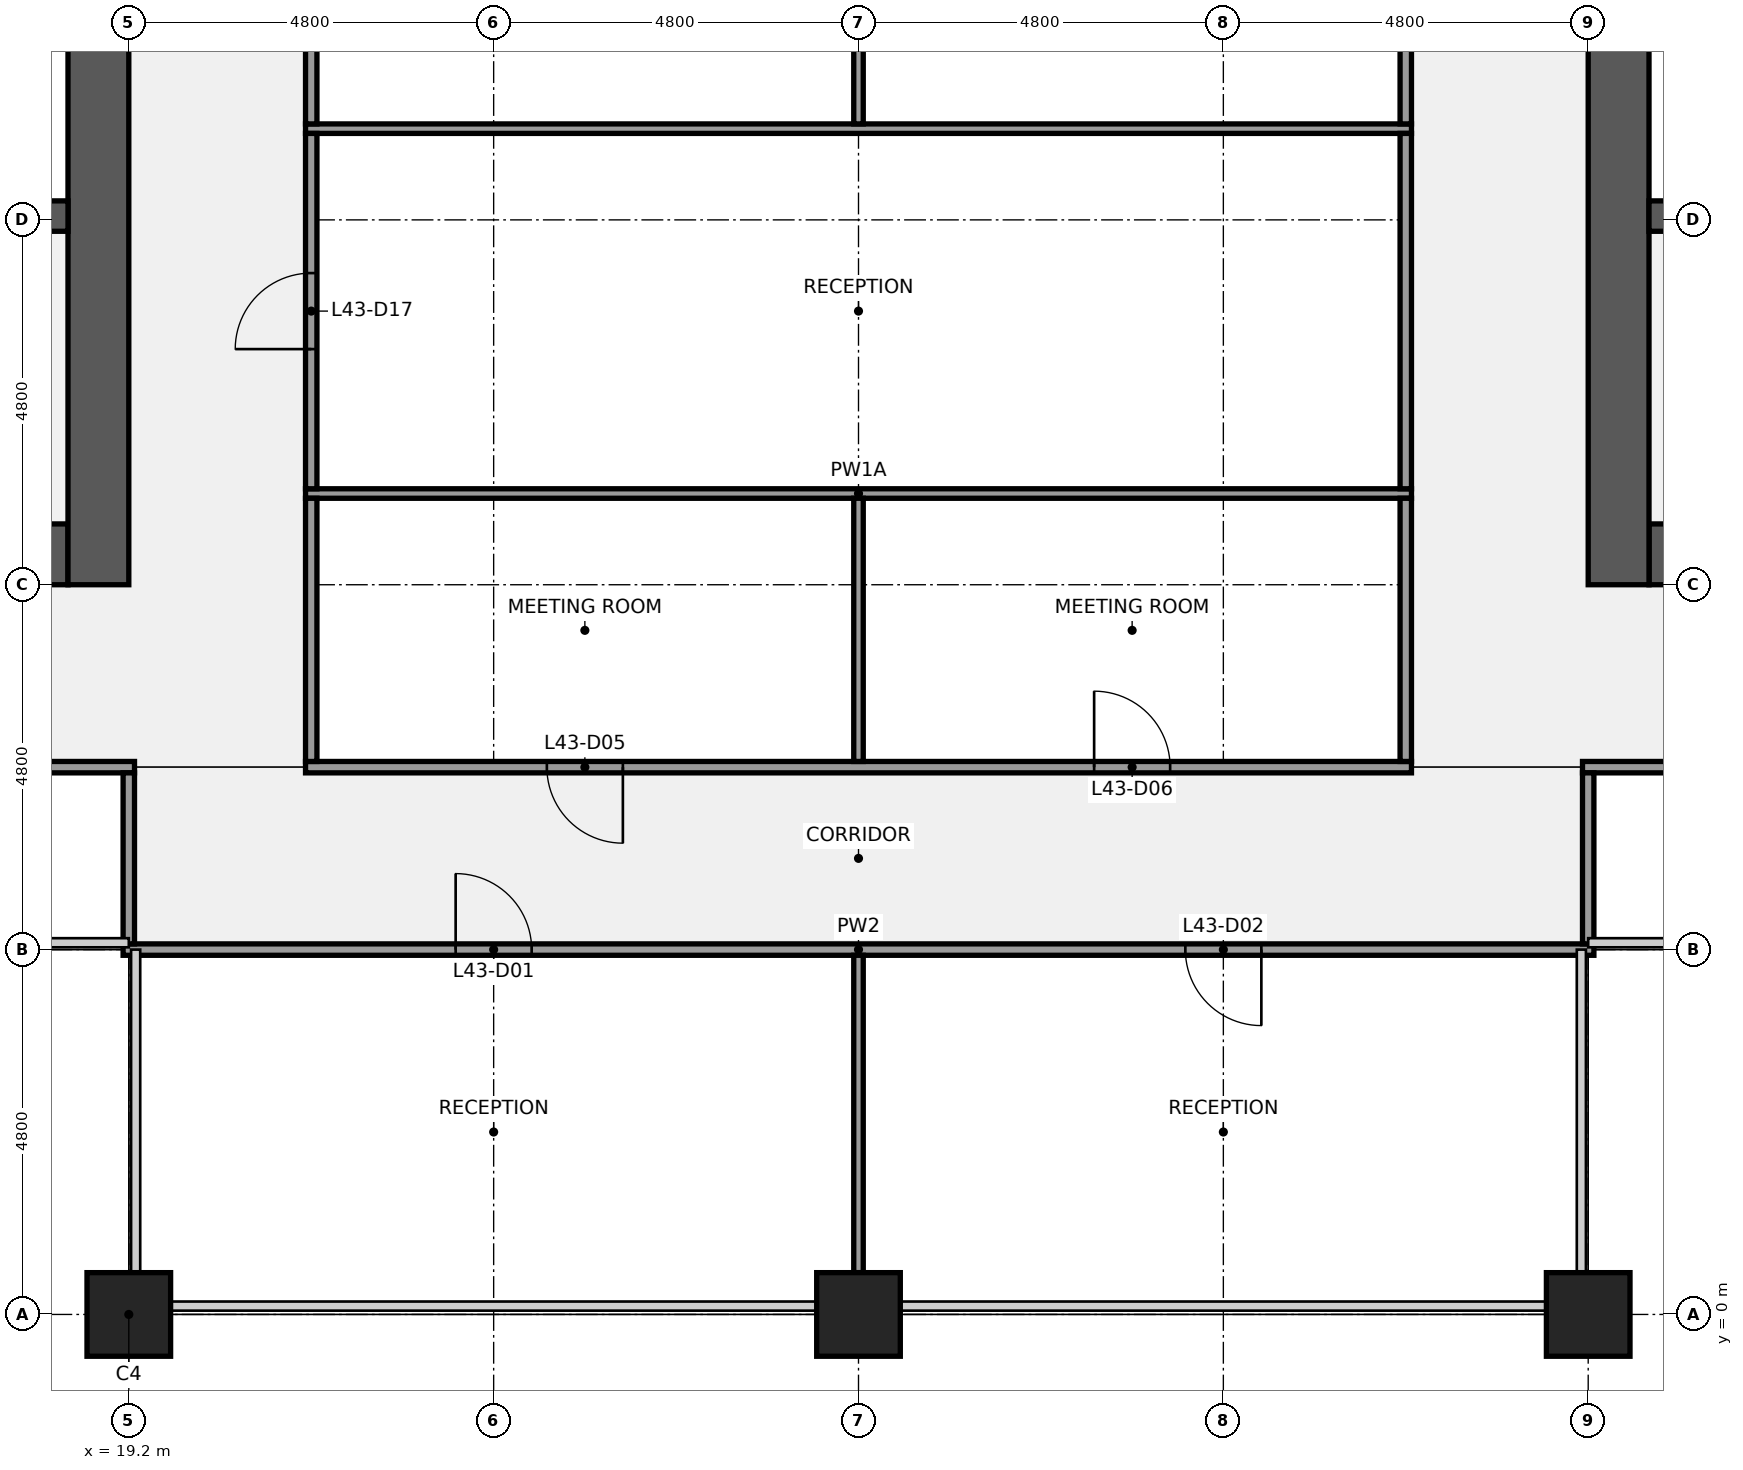
"""IFC4 building model, lengths in metres.
Left out: names, types, materials, properties, quantities, classifications, styles, units other than length and angle.
Written with IfcOpenShell. Run it as: python <this file> out.ifc"""

import sys

from ifc_helpers import new_model, si_unit, direction, frame, frame_2d, origin, origin_2d, place, context, subcontext, project, spatial, rectangle, extrude, element, fill, save


model = new_model("IFC4")
c1 = context("Model", 3, precision=1e-05, world=origin(), true_north=direction((0.0, 1.0)))
c2 = subcontext(c1, "Body", "Model", "MODEL_VIEW")
j1 = project(units=[si_unit("LENGTHUNIT", "METRE"), si_unit("PLANEANGLEUNIT", "RADIAN")], contexts=[c1])
p1 = place(None, origin())
s1 = spatial("IfcSite", under=j1, at=p1, CompositionType="ELEMENT")
p2 = place(p1, origin())
s2 = spatial("IfcBuilding", under=s1, at=p2, CompositionType="ELEMENT")
p3 = place(p2, frame((0.0, 0.0, 201.2)))
s3 = spatial("IfcBuildingStorey", under=s2, at=p3, CompositionType="ELEMENT", Elevation=201.2)
for number, where, z_axis, x_axis in (
    (1, (19.2, 0.0, 0.0), (0.0, 0.0, 1.0), (1.0, 0.0, 0.0)),
    (2, (28.8, 0.0, 0.0), (0.0, 0.0, 1.0), (1.0, 0.0, 0.0)),
    (3, (38.4, 0.0, 0.0), (0.0, 0.0, 1.0), (1.0, 0.0, 0.0)),
):
    element("IfcColumn", number, at=place(p3, frame(where, z_axis=z_axis, x_axis=x_axis)), inside=s3, PredefinedType="COLUMN", context=c2, shape_type="SweptSolid", body=[
        extrude(rectangle(XDim=1.1, YDim=1.1, at=origin_2d()), origin(), (0.0, 0.0, 1.0), 4.0),
    ])
p4 = place(p3, frame((18.4, 10.0, 0.0), z_axis=(0.0, 0.0, 1.0), x_axis=(-1.0, 0.0, 0.0)))
e4 = element("IfcWall", 4, at=p4, inside=s3, PredefinedType="SHEAR", context=c2, shape_type="SweptSolid", body=[
    extrude(rectangle(XDim=8.8, YDim=0.8, at=frame_2d((4.4, 0.0))), origin(), (0.0, 0.0, 1.0), 3.84),
])
p5 = place(p4, frame((1.05, 0.0, 0.0)))
e5 = element("IfcOpeningElement", 5, at=p5, cuts=e4, PredefinedType="OPENING", context=c2, shape_type="SweptSolid", body=[
    extrude(rectangle(XDim=1.1, YDim=2.1, at=frame_2d((0.55, 1.05))), frame((0.0, 0.41, 0.0), z_axis=(0.0, -1.0, 0.0), x_axis=(1.0, 0.0, 0.0)), (0.0, 0.0, 1.0), 0.82),
])
p6 = place(p3, frame((18.8, 38.4, 0.0), z_axis=(0.0, 0.0, 1.0), x_axis=(0.0, -1.0, 0.0)))
e6 = element("IfcWall", 6, at=p6, inside=s3, PredefinedType="SHEAR", context=c2, shape_type="SweptSolid", body=[
    extrude(rectangle(XDim=28.8, YDim=0.8, at=frame_2d((14.4, 0.0))), origin(), (0.0, 0.0, 1.0), 3.84),
])
p7 = place(p6, frame((18.3, 0.0, 0.0)))
e7 = element("IfcOpeningElement", 7, at=p7, cuts=e6, PredefinedType="OPENING", context=c2, shape_type="SweptSolid", body=[
    extrude(rectangle(XDim=1.8, YDim=2.1, at=frame_2d((0.9, 1.05))), frame((0.0, 0.41, 0.0), z_axis=(0.0, -1.0, 0.0), x_axis=(1.0, 0.0, 0.0)), (0.0, 0.0, 1.0), 0.82),
])
p8 = place(p6, frame((8.7, 0.0, 0.0)))
e8 = element("IfcOpeningElement", 8, at=p8, cuts=e6, PredefinedType="OPENING", context=c2, shape_type="SweptSolid", body=[
    extrude(rectangle(XDim=1.8, YDim=2.1, at=frame_2d((0.9, 1.05))), frame((0.0, 0.41, 0.0), z_axis=(0.0, -1.0, 0.0), x_axis=(1.0, 0.0, 0.0)), (0.0, 0.0, 1.0), 0.82),
])
p9 = place(p3, frame((0.8, 14.45, 0.0), z_axis=(0.0, 0.0, 1.0), x_axis=(1.0, 0.0, 0.0)))
e9 = element("IfcWall", 9, at=p9, inside=s3, PredefinedType="SHEAR", context=c2, shape_type="SweptSolid", body=[
    extrude(rectangle(XDim=17.6, YDim=0.4, at=frame_2d((8.8, 0.0))), origin(), (0.0, 0.0, 1.0), 3.84),
])
p10 = place(p3, frame((48.0, 10.0, 0.0), z_axis=(0.0, 0.0, 1.0), x_axis=(-1.0, 0.0, 0.0)))
e10 = element("IfcWall", 10, at=p10, inside=s3, PredefinedType="SHEAR", context=c2, shape_type="SweptSolid", body=[
    extrude(rectangle(XDim=8.8, YDim=0.8, at=frame_2d((4.4, 0.0))), origin(), (0.0, 0.0, 1.0), 3.84),
])
p11 = place(p10, frame((6.65, 0.0, 0.0)))
e11 = element("IfcOpeningElement", 11, at=p11, cuts=e10, PredefinedType="OPENING", context=c2, shape_type="SweptSolid", body=[
    extrude(rectangle(XDim=1.1, YDim=2.1, at=frame_2d((0.55, 1.05))), frame((0.0, 0.41, 0.0), z_axis=(0.0, -1.0, 0.0), x_axis=(1.0, 0.0, 0.0)), (0.0, 0.0, 1.0), 0.82),
])
p12 = place(p3, frame((38.8, 9.6, 0.0), z_axis=(0.0, 0.0, 1.0), x_axis=(0.0, 1.0, 0.0)))
e12 = element("IfcWall", 12, at=p12, inside=s3, PredefinedType="SHEAR", context=c2, shape_type="SweptSolid", body=[
    extrude(rectangle(XDim=28.8, YDim=0.8, at=frame_2d((14.4, 0.0))), origin(), (0.0, 0.0, 1.0), 3.84),
])
p13 = place(p12, frame((8.7, 0.0, 0.0)))
e13 = element("IfcOpeningElement", 13, at=p13, cuts=e12, PredefinedType="OPENING", context=c2, shape_type="SweptSolid", body=[
    extrude(rectangle(XDim=1.8, YDim=2.1, at=frame_2d((0.9, 1.05))), frame((0.0, 0.41, 0.0), z_axis=(0.0, -1.0, 0.0), x_axis=(1.0, 0.0, 0.0)), (0.0, 0.0, 1.0), 0.82),
])
p14 = place(p12, frame((18.3, 0.0, 0.0)))
e14 = element("IfcOpeningElement", 14, at=p14, cuts=e12, PredefinedType="OPENING", context=c2, shape_type="SweptSolid", body=[
    extrude(rectangle(XDim=1.8, YDim=2.1, at=frame_2d((0.9, 1.05))), frame((0.0, 0.41, 0.0), z_axis=(0.0, -1.0, 0.0), x_axis=(1.0, 0.0, 0.0)), (0.0, 0.0, 1.0), 0.82),
])
p15 = place(p3, frame((39.2, 14.45, 0.0), z_axis=(0.0, 0.0, 1.0), x_axis=(1.0, 0.0, 0.0)))
e15 = element("IfcWall", 15, at=p15, inside=s3, PredefinedType="SHEAR", context=c2, shape_type="SweptSolid", body=[
    extrude(rectangle(XDim=17.6, YDim=0.4, at=frame_2d((8.8, 0.0))), origin(), (0.0, 0.0, 1.0), 3.84),
])
p16 = place(p3, frame((19.125, 4.8, 0.0), z_axis=(0.0, 0.0, 1.0), x_axis=(1.0, 0.0, 0.0)))
e16 = element("IfcWall", 16, at=p16, inside=s3, PredefinedType="PARTITIONING", context=c2, shape_type="SweptSolid", body=[
    extrude(rectangle(XDim=19.35, YDim=0.15, at=frame_2d((9.675, 0.0))), origin(), (0.0, 0.0, 1.0), 2.87),
])
p17 = place(p16, frame((4.375, 0.0, 0.0)))
e17 = element("IfcOpeningElement", 17, at=p17, cuts=e16, PredefinedType="OPENING", context=c2, shape_type="SweptSolid", body=[
    extrude(rectangle(XDim=1.0, YDim=2.1, at=frame_2d((0.5, 1.05))), frame((0.0, 0.085, 0.0), z_axis=(0.0, -1.0, 0.0), x_axis=(1.0, 0.0, 0.0)), (0.0, 0.0, 1.0), 0.17),
])
p18 = place(p16, frame((13.975, 0.0, 0.0)))
e18 = element("IfcOpeningElement", 18, at=p18, cuts=e16, PredefinedType="OPENING", context=c2, shape_type="SweptSolid", body=[
    extrude(rectangle(XDim=1.0, YDim=2.1, at=frame_2d((0.5, 1.05))), frame((0.0, 0.085, 0.0), z_axis=(0.0, -1.0, 0.0), x_axis=(1.0, 0.0, 0.0)), (0.0, 0.0, 1.0), 0.17),
])
p19 = place(p3, frame((9.7, 7.2, 0.0), z_axis=(0.0, 0.0, 1.0), x_axis=(1.0, 0.0, 0.0)))
e19 = element("IfcWall", 19, at=p19, inside=s3, PredefinedType="PARTITIONING", context=c2, shape_type="SweptSolid", body=[
    extrude(rectangle(XDim=9.575, YDim=0.15, at=frame_2d((4.788, 0.0))), origin(), (0.0, 0.0, 1.0), 2.87),
])
p20 = place(p19, frame((1.85, 0.0, 0.0)))
e20 = element("IfcOpeningElement", 20, at=p20, cuts=e19, PredefinedType="OPENING", context=c2, shape_type="SweptSolid", body=[
    extrude(rectangle(XDim=1.0, YDim=2.1, at=frame_2d((0.5, 1.05))), frame((0.0, 0.085, 0.0), z_axis=(0.0, -1.0, 0.0), x_axis=(1.0, 0.0, 0.0)), (0.0, 0.0, 1.0), 0.17),
])
p21 = place(p19, frame((6.6, 0.0, 0.0)))
e21 = element("IfcOpeningElement", 21, at=p21, cuts=e19, PredefinedType="OPENING", context=c2, shape_type="SweptSolid", body=[
    extrude(rectangle(XDim=1.0, YDim=2.1, at=frame_2d((0.5, 1.05))), frame((0.0, 0.085, 0.0), z_axis=(0.0, -1.0, 0.0), x_axis=(1.0, 0.0, 0.0)), (0.0, 0.0, 1.0), 0.17),
])
p22 = place(p3, frame((21.525, 7.2, 0.0), z_axis=(0.0, 0.0, 1.0), x_axis=(1.0, 0.0, 0.0)))
e22 = element("IfcWall", 22, at=p22, inside=s3, PredefinedType="PARTITIONING", context=c2, shape_type="SweptSolid", body=[
    extrude(rectangle(XDim=14.55, YDim=0.15, at=frame_2d((7.275, 0.0))), origin(), (0.0, 0.0, 1.0), 2.87),
])
p23 = place(p22, frame((3.175, 0.0, 0.0)))
e23 = element("IfcOpeningElement", 23, at=p23, cuts=e22, PredefinedType="OPENING", context=c2, shape_type="SweptSolid", body=[
    extrude(rectangle(XDim=1.0, YDim=2.1, at=frame_2d((0.5, 1.05))), frame((0.0, 0.085, 0.0), z_axis=(0.0, -1.0, 0.0), x_axis=(1.0, 0.0, 0.0)), (0.0, 0.0, 1.0), 0.17),
])
p24 = place(p22, frame((10.375, 0.0, 0.0)))
e24 = element("IfcOpeningElement", 24, at=p24, cuts=e22, PredefinedType="OPENING", context=c2, shape_type="SweptSolid", body=[
    extrude(rectangle(XDim=1.0, YDim=2.1, at=frame_2d((0.5, 1.05))), frame((0.0, 0.085, 0.0), z_axis=(0.0, -1.0, 0.0), x_axis=(1.0, 0.0, 0.0)), (0.0, 0.0, 1.0), 0.17),
])
p25 = place(p3, frame((38.325, 7.2, 0.0), z_axis=(0.0, 0.0, 1.0), x_axis=(1.0, 0.0, 0.0)))
e25 = element("IfcWall", 25, at=p25, inside=s3, PredefinedType="PARTITIONING", context=c2, shape_type="SweptSolid", body=[
    extrude(rectangle(XDim=9.575, YDim=0.15, at=frame_2d((4.788, 0.0))), origin(), (0.0, 0.0, 1.0), 2.87),
])
p26 = place(p25, frame((4.325, 0.0, 0.0)))
e26 = element("IfcOpeningElement", 26, at=p26, cuts=e25, PredefinedType="OPENING", context=c2, shape_type="SweptSolid", body=[
    extrude(rectangle(XDim=1.0, YDim=2.1, at=frame_2d((0.5, 1.05))), frame((0.0, 0.085, 0.0), z_axis=(0.0, -1.0, 0.0), x_axis=(1.0, 0.0, 0.0)), (0.0, 0.0, 1.0), 0.17),
])
for number, where, z_axis, x_axis in (
    (27, (21.525, 10.8, 0.0), (0.0, 0.0, 1.0), (1.0, 0.0, 0.0)),
    (28, (21.525, 15.6, 0.0), (0.0, 0.0, 1.0), (1.0, 0.0, 0.0)),
):
    element("IfcWall", number, at=place(p3, frame(where, z_axis=z_axis, x_axis=x_axis)), inside=s3, PredefinedType="PARTITIONING", context=c2, shape_type="SweptSolid", body=[
        extrude(rectangle(XDim=14.55, YDim=0.125, at=frame_2d((7.275, 0.0))), origin(), (0.0, 0.0, 1.0), 2.87),
    ])
p27 = place(p3, frame((19.2, 4.875, 0.0), z_axis=(0.0, 0.0, 1.0), x_axis=(0.0, 1.0, 0.0)))
e29 = element("IfcWall", 29, at=p27, inside=s3, PredefinedType="PARTITIONING", context=c2, shape_type="SweptSolid", body=[
    extrude(rectangle(XDim=2.25, YDim=0.15, at=frame_2d((1.125, 0.0))), origin(), (0.0, 0.0, 1.0), 2.87),
])
p28 = place(p3, frame((21.6, 7.275, 0.0), z_axis=(0.0, 0.0, 1.0), x_axis=(0.0, 1.0, 0.0)))
e30 = element("IfcWall", 30, at=p28, inside=s3, PredefinedType="PARTITIONING", context=c2, shape_type="SweptSolid", body=[
    extrude(rectangle(XDim=3.463, YDim=0.15, at=frame_2d((1.731, 0.0))), origin(), (0.0, 0.0, 1.0), 2.87),
])
p29 = place(p3, frame((21.6, 10.863, 0.0), z_axis=(0.0, 0.0, 1.0), x_axis=(0.0, 1.0, 0.0)))
e31 = element("IfcWall", 31, at=p29, inside=s3, PredefinedType="PARTITIONING", context=c2, shape_type="SweptSolid", body=[
    extrude(rectangle(XDim=4.675, YDim=0.15, at=frame_2d((2.337, 0.0))), origin(), (0.0, 0.0, 1.0), 2.87),
])
p30 = place(p29, frame((1.837, 0.0, 0.0)))
e32 = element("IfcOpeningElement", 32, at=p30, cuts=e31, PredefinedType="OPENING", context=c2, shape_type="SweptSolid", body=[
    extrude(rectangle(XDim=1.0, YDim=2.1, at=frame_2d((0.5, 1.05))), frame((0.0, 0.085, 0.0), z_axis=(0.0, -1.0, 0.0), x_axis=(1.0, 0.0, 0.0)), (0.0, 0.0, 1.0), 0.17),
])
p31 = place(p3, frame((21.6, 15.663, 0.0), z_axis=(0.0, 0.0, 1.0), x_axis=(0.0, 1.0, 0.0)))
e33 = element("IfcWall", 33, at=p31, inside=s3, PredefinedType="PARTITIONING", context=c2, shape_type="SweptSolid", body=[
    extrude(rectangle(XDim=9.475, YDim=0.15, at=frame_2d((4.737, 0.0))), origin(), (0.0, 0.0, 1.0), 2.87),
])
p32 = place(p31, frame((4.238, 0.0, 0.0)))
e34 = element("IfcOpeningElement", 34, at=p32, cuts=e33, PredefinedType="OPENING", context=c2, shape_type="SweptSolid", body=[
    extrude(rectangle(XDim=1.0, YDim=2.1, at=frame_2d((0.5, 1.05))), frame((0.0, 0.085, 0.0), z_axis=(0.0, -1.0, 0.0), x_axis=(1.0, 0.0, 0.0)), (0.0, 0.0, 1.0), 0.17),
])
p33 = place(p3, frame((28.8, 0.55, 0.0), z_axis=(0.0, 0.0, 1.0), x_axis=(0.0, 1.0, 0.0)))
e35 = element("IfcWall", 35, at=p33, inside=s3, PredefinedType="PARTITIONING", context=c2, shape_type="SweptSolid", body=[
    extrude(rectangle(XDim=4.175, YDim=0.125, at=frame_2d((2.087, 0.0))), origin(), (0.0, 0.0, 1.0), 2.87),
])
p34 = place(p3, frame((28.8, 7.275, 0.0), z_axis=(0.0, 0.0, 1.0), x_axis=(0.0, 1.0, 0.0)))
e36 = element("IfcWall", 36, at=p34, inside=s3, PredefinedType="PARTITIONING", context=c2, shape_type="SweptSolid", body=[
    extrude(rectangle(XDim=3.463, YDim=0.125, at=frame_2d((1.731, 0.0))), origin(), (0.0, 0.0, 1.0), 2.87),
])
p35 = place(p3, frame((28.8, 15.663, 0.0), z_axis=(0.0, 0.0, 1.0), x_axis=(0.0, 1.0, 0.0)))
e37 = element("IfcWall", 37, at=p35, inside=s3, PredefinedType="PARTITIONING", context=c2, shape_type="SweptSolid", body=[
    extrude(rectangle(XDim=9.475, YDim=0.125, at=frame_2d((4.737, 0.0))), origin(), (0.0, 0.0, 1.0), 2.87),
])
p36 = place(p3, frame((36.0, 7.275, 0.0), z_axis=(0.0, 0.0, 1.0), x_axis=(0.0, 1.0, 0.0)))
e38 = element("IfcWall", 38, at=p36, inside=s3, PredefinedType="PARTITIONING", context=c2, shape_type="SweptSolid", body=[
    extrude(rectangle(XDim=3.463, YDim=0.15, at=frame_2d((1.731, 0.0))), origin(), (0.0, 0.0, 1.0), 2.87),
])
p37 = place(p3, frame((36.0, 10.863, 0.0), z_axis=(0.0, 0.0, 1.0), x_axis=(0.0, 1.0, 0.0)))
e39 = element("IfcWall", 39, at=p37, inside=s3, PredefinedType="PARTITIONING", context=c2, shape_type="SweptSolid", body=[
    extrude(rectangle(XDim=4.675, YDim=0.15, at=frame_2d((2.337, 0.0))), origin(), (0.0, 0.0, 1.0), 2.87),
])
p38 = place(p3, frame((36.0, 15.663, 0.0), z_axis=(0.0, 0.0, 1.0), x_axis=(0.0, 1.0, 0.0)))
e40 = element("IfcWall", 40, at=p38, inside=s3, PredefinedType="PARTITIONING", context=c2, shape_type="SweptSolid", body=[
    extrude(rectangle(XDim=9.475, YDim=0.15, at=frame_2d((4.737, 0.0))), origin(), (0.0, 0.0, 1.0), 2.87),
])
p39 = place(p38, frame((4.238, 0.0, 0.0)))
e41 = element("IfcOpeningElement", 41, at=p39, cuts=e40, PredefinedType="OPENING", context=c2, shape_type="SweptSolid", body=[
    extrude(rectangle(XDim=1.0, YDim=2.1, at=frame_2d((0.5, 1.05))), frame((0.0, 0.085, 0.0), z_axis=(0.0, -1.0, 0.0), x_axis=(1.0, 0.0, 0.0)), (0.0, 0.0, 1.0), 0.17),
])
p40 = place(p3, frame((38.4, 4.875, 0.0), z_axis=(0.0, 0.0, 1.0), x_axis=(0.0, 1.0, 0.0)))
e42 = element("IfcWall", 42, at=p40, inside=s3, PredefinedType="PARTITIONING", context=c2, shape_type="SweptSolid", body=[
    extrude(rectangle(XDim=2.25, YDim=0.15, at=frame_2d((1.125, 0.0))), origin(), (0.0, 0.0, 1.0), 2.87),
])
for number, where, z_axis, x_axis in (
    (43, (19.2, -1.025, 0.0), (0.0, 0.0, 1.0), (1.0, 0.0, 0.0)),
    (44, (38.4, -1.025, 0.0), (0.0, 0.0, 1.0), (1.0, 0.0, 0.0)),
):
    element("IfcColumn", number, at=place(p3, frame(where, z_axis=z_axis, x_axis=x_axis)), inside=s3, PredefinedType="PILASTER", context=c2, shape_type="SweptSolid", body=[
        extrude(rectangle(XDim=2.4, YDim=0.95, at=origin_2d()), origin(), (0.0, 0.0, 1.0), 4.0),
    ])
p41 = place(p17, origin())
e45 = element("IfcDoor", 45, at=p41, inside=s3, OperationType="SINGLE_SWING_LEFT", PredefinedType="DOOR", context=c2, shape_type="SweptSolid", body=[
    extrude(rectangle(XDim=1.0, YDim=2.1, at=frame_2d((0.5, 1.05))), frame((0.0, 0.025, 0.0), z_axis=(0.0, -1.0, 0.0), x_axis=(1.0, 0.0, 0.0)), (0.0, 0.0, 1.0), 0.05),
])
fill(e17, e45)
p42 = place(p18, origin())
e46 = element("IfcDoor", 46, at=p42, inside=s3, OperationType="SINGLE_SWING_RIGHT", PredefinedType="DOOR", context=c2, shape_type="SweptSolid", body=[
    extrude(rectangle(XDim=1.0, YDim=2.1, at=frame_2d((0.5, 1.05))), frame((0.0, 0.025, 0.0), z_axis=(0.0, -1.0, 0.0), x_axis=(1.0, 0.0, 0.0)), (0.0, 0.0, 1.0), 0.05),
])
fill(e18, e46)
p43 = place(p23, origin())
e47 = element("IfcDoor", 47, at=p43, inside=s3, OperationType="SINGLE_SWING_RIGHT", PredefinedType="DOOR", context=c2, shape_type="SweptSolid", body=[
    extrude(rectangle(XDim=1.0, YDim=2.1, at=frame_2d((0.5, 1.05))), frame((0.0, 0.025, 0.0), z_axis=(0.0, -1.0, 0.0), x_axis=(1.0, 0.0, 0.0)), (0.0, 0.0, 1.0), 0.05),
])
fill(e23, e47)
p44 = place(p24, origin())
e48 = element("IfcDoor", 48, at=p44, inside=s3, OperationType="SINGLE_SWING_LEFT", PredefinedType="DOOR", context=c2, shape_type="SweptSolid", body=[
    extrude(rectangle(XDim=1.0, YDim=2.1, at=frame_2d((0.5, 1.05))), frame((0.0, 0.025, 0.0), z_axis=(0.0, -1.0, 0.0), x_axis=(1.0, 0.0, 0.0)), (0.0, 0.0, 1.0), 0.05),
])
fill(e24, e48)
p45 = place(p30, origin())
e49 = element("IfcDoor", 49, at=p45, inside=s3, OperationType="SINGLE_SWING_LEFT", PredefinedType="DOOR", context=c2, shape_type="SweptSolid", body=[
    extrude(rectangle(XDim=1.0, YDim=2.1, at=frame_2d((0.5, 1.05))), frame((0.0, 0.025, 0.0), z_axis=(0.0, -1.0, 0.0), x_axis=(1.0, 0.0, 0.0)), (0.0, 0.0, 1.0), 0.05),
])
fill(e32, e49)
save(model, sys.argv[1])
